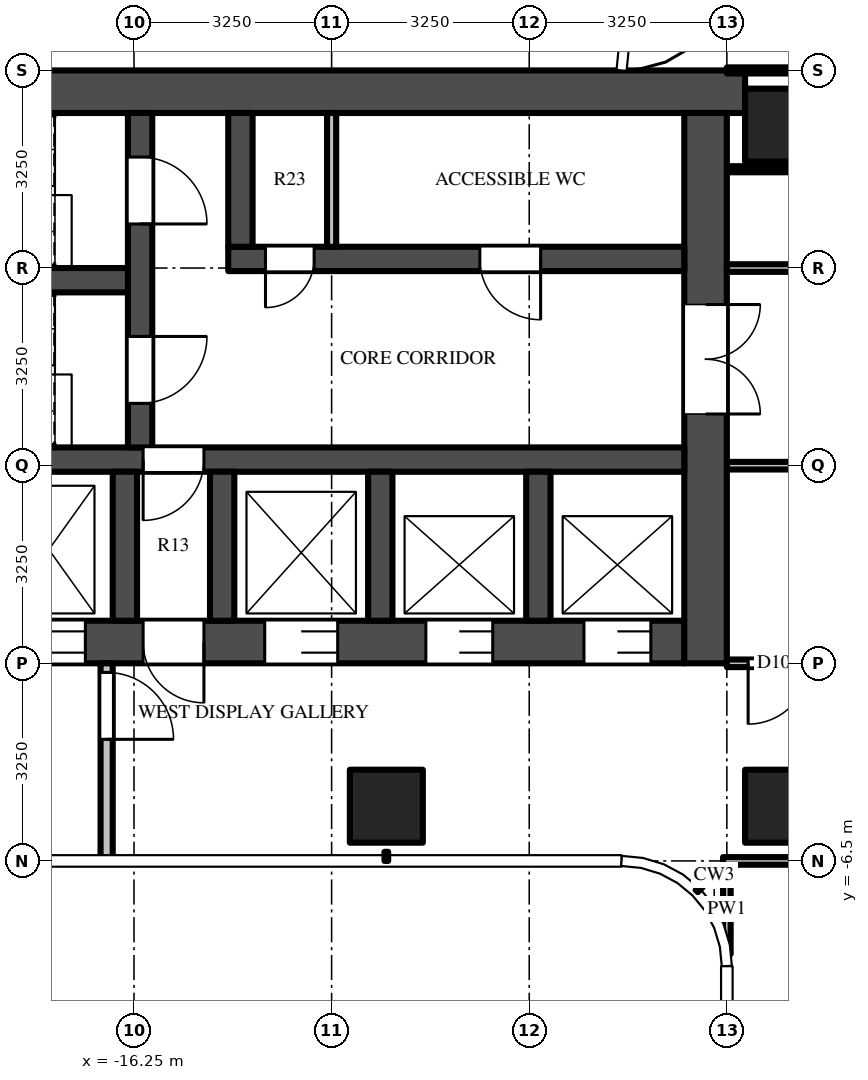
"""IFC4 building model, lengths in metres.
Left out: names, types, materials, properties, quantities, classifications, styles, units other than length and angle.
Written with IfcOpenShell. Run it as: python <this file> out.ifc"""

import sys

from ifc_helpers import new_model, si_unit, direction, frame, frame_2d, origin, origin_2d, place, context, subcontext, project, spatial, rectangle, extrude, source, transform, mapped, element, fill, save


model = new_model("IFC4")
c1 = context("Model", 3, precision=1e-05, world=origin(), true_north=direction((0.0, 1.0)))
c2 = subcontext(c1, "Body", "Model", "MODEL_VIEW")
j1 = project(units=[si_unit("LENGTHUNIT", "METRE"), si_unit("PLANEANGLEUNIT", "RADIAN")], contexts=[c1])
p1 = place(None, origin())
s1 = spatial("IfcSite", under=j1, at=p1, CompositionType="ELEMENT")
p2 = place(p1, origin())
s2 = spatial("IfcBuilding", under=s1, at=p2, CompositionType="ELEMENT")
p3 = place(p2, frame((0.0, 0.0, 162.0)))
s3 = spatial("IfcBuildingStorey", under=s2, at=p3, CompositionType="ELEMENT", Elevation=162.0)
m1 = source(origin(), c2, "Body", "SweptSolid", [
    extrude(rectangle(XDim=1.2, YDim=1.2, at=origin_2d()), origin(), (0.0, 0.0, 1.0), 3.9),
])
for number, where, z_axis, x_axis in (
    (1, (-5.6, 5.6, 0.0), (0.0, 0.0, 1.0), (1.0, 0.0, 0.0)),
    (2, (-5.6, -5.6, 0.0), (0.0, 0.0, 1.0), (1.0, 0.0, 0.0)),
    (3, (-12.1, -5.6, 0.0), (0.0, 0.0, 1.0), (1.0, 0.0, 0.0)),
):
    element("IfcColumn", number, at=place(p3, frame(where, z_axis=z_axis, x_axis=x_axis)), inside=s3, PredefinedType="COLUMN", context=c2, shape_type="MappedRepresentation", body=[
        mapped(m1, transform((0.0, 0.0, 0.0))),
    ])
m2 = source(origin(), c2, "Body", "SweptSolid", [
    extrude(rectangle(XDim=16.55, YDim=0.7, at=frame_2d((8.275, 0.0))), origin(), (0.0, 0.0, 1.0), 3.7),
])
p4 = place(p3, frame((-6.2, 6.15, 0.0), z_axis=(0.0, 0.0, 1.0), x_axis=(-1.0, 0.0, 0.0)))
e4 = element("IfcWall", 4, at=p4, inside=s3, PredefinedType="SHEAR", context=c2, shape_type="MappedRepresentation", body=[
    mapped(m2, transform((0.0, 0.0, 0.0))),
])
m3 = source(origin(), c2, "Body", "SweptSolid", [
    extrude(rectangle(XDim=14.85, YDim=0.7, at=frame_2d((7.425, 0.0))), origin(), (0.0, 0.0, 1.0), 3.7),
])
p5 = place(p3, frame((-7.2, -2.9, 0.0), z_axis=(0.0, 0.0, 1.0), x_axis=(-1.0, 0.0, 0.0)))
e5 = element("IfcWall", 5, at=p5, inside=s3, PredefinedType="SHEAR", context=c2, shape_type="MappedRepresentation", body=[
    mapped(m3, transform((0.0, 0.0, 0.0))),
])
m4 = source(origin(), c2, "Body", "SweptSolid", [
    extrude(rectangle(XDim=1.1, YDim=2.1, at=frame_2d((0.55, 1.05))), frame((0.0, 0.36, 0.0), z_axis=(0.0, -1.0, 0.0), x_axis=(1.0, 0.0, 0.0)), (0.0, 0.0, 1.0), 0.72),
])
p6 = place(p5, frame((0.55, 0.0, 0.0)))
e6 = element("IfcOpeningElement", 6, at=p6, cuts=e5, PredefinedType="OPENING", context=c2, shape_type="MappedRepresentation", body=[
    mapped(m4, transform((0.0, 0.0, 0.0))),
])
p7 = place(p5, frame((3.15, 0.0, 0.0)))
e7 = element("IfcOpeningElement", 7, at=p7, cuts=e5, PredefinedType="OPENING", context=c2, shape_type="MappedRepresentation", body=[
    mapped(m4, transform((0.0, 0.0, 0.0))),
])
m5 = source(origin(), c2, "Body", "SweptSolid", [
    extrude(rectangle(XDim=1.2, YDim=2.1, at=frame_2d((0.6, 1.05))), frame((0.0, 0.36, 0.0), z_axis=(0.0, -1.0, 0.0), x_axis=(1.0, 0.0, 0.0)), (0.0, 0.0, 1.0), 0.72),
])
p8 = place(p5, frame((5.7, 0.0, 0.0)))
e8 = element("IfcOpeningElement", 8, at=p8, cuts=e5, PredefinedType="OPENING", context=c2, shape_type="MappedRepresentation", body=[
    mapped(m5, transform((0.0, 0.0, 0.0))),
])
m6 = source(origin(), c2, "Body", "SweptSolid", [
    extrude(rectangle(XDim=1.3, YDim=2.1, at=frame_2d((0.65, 1.05))), frame((0.0, 0.36, 0.0), z_axis=(0.0, -1.0, 0.0), x_axis=(1.0, 0.0, 0.0)), (0.0, 0.0, 1.0), 0.72),
])
p9 = place(p5, frame((12.2, 0.0, 0.0)))
e9 = element("IfcOpeningElement", 9, at=p9, cuts=e5, PredefinedType="OPENING", context=c2, shape_type="MappedRepresentation", body=[
    mapped(m6, transform((0.0, 0.0, 0.0))),
])
p10 = place(p5, frame((9.85, 0.0, 0.0)))
e10 = element("IfcOpeningElement", 10, at=p10, cuts=e5, PredefinedType="OPENING", context=c2, shape_type="MappedRepresentation", body=[
    mapped(m5, transform((0.0, 0.0, 0.0))),
])
m7 = source(origin(), c2, "Body", "SweptSolid", [
    extrude(rectangle(XDim=1.0, YDim=2.1, at=frame_2d((0.5, 1.05))), frame((0.0, 0.36, 0.0), z_axis=(0.0, -1.0, 0.0), x_axis=(1.0, 0.0, 0.0)), (0.0, 0.0, 1.0), 0.72),
])
p11 = place(p5, frame((7.9, 0.0, 0.0)))
e11 = element("IfcOpeningElement", 11, at=p11, cuts=e5, PredefinedType="OPENING", context=c2, shape_type="MappedRepresentation", body=[
    mapped(m7, transform((0.0, 0.0, 0.0))),
])
m8 = source(origin(), c2, "Body", "SweptSolid", [
    extrude(rectangle(XDim=9.05, YDim=0.7, at=frame_2d((4.525, 0.0))), origin(), (0.0, 0.0, 1.0), 3.7),
])
p12 = place(p3, frame((-6.85, 5.8, 0.0), z_axis=(0.0, 0.0, 1.0), x_axis=(0.0, -1.0, 0.0)))
e12 = element("IfcWall", 12, at=p12, inside=s3, PredefinedType="SHEAR", context=c2, shape_type="MappedRepresentation", body=[
    mapped(m8, transform((0.0, 0.0, 0.0))),
])
m9 = source(origin(), c2, "Body", "SweptSolid", [
    extrude(rectangle(XDim=1.8, YDim=2.1, at=frame_2d((0.9, 1.05))), frame((0.0, 0.36, 0.0), z_axis=(0.0, -1.0, 0.0), x_axis=(1.0, 0.0, 0.0)), (0.0, 0.0, 1.0), 0.72),
])
p13 = place(p12, frame((3.15, 0.0, 0.0)))
e13 = element("IfcOpeningElement", 13, at=p13, cuts=e12, PredefinedType="OPENING", context=c2, shape_type="MappedRepresentation", body=[
    mapped(m9, transform((0.0, 0.0, 0.0))),
])
m10 = source(origin(), c2, "Body", "SweptSolid", [
    extrude(rectangle(XDim=7.5, YDim=0.4, at=frame_2d((3.75, 0.0))), origin(), (0.0, 0.0, 1.0), 3.7),
])
p14 = place(p3, frame((-7.2, 3.4, 0.0), z_axis=(0.0, 0.0, 1.0), x_axis=(-1.0, 0.0, 0.0)))
e14 = element("IfcWall", 14, at=p14, inside=s3, PredefinedType="SHEAR", context=c2, shape_type="MappedRepresentation", body=[
    mapped(m10, transform((0.0, 0.0, 0.0))),
])
m11 = source(origin(), c2, "Body", "SweptSolid", [
    extrude(rectangle(XDim=1.0, YDim=2.1, at=frame_2d((0.5, 1.05))), frame((0.0, 0.21, 0.0), z_axis=(0.0, -1.0, 0.0), x_axis=(1.0, 0.0, 0.0)), (0.0, 0.0, 1.0), 0.42),
])
p15 = place(p14, frame((2.363, 0.0, 0.0)))
e15 = element("IfcOpeningElement", 15, at=p15, cuts=e14, PredefinedType="OPENING", context=c2, shape_type="MappedRepresentation", body=[
    mapped(m11, transform((0.0, 0.0, 0.0))),
])
m12 = source(origin(), c2, "Body", "SweptSolid", [
    extrude(rectangle(XDim=0.8, YDim=2.1, at=frame_2d((0.4, 1.05))), frame((0.0, 0.21, 0.0), z_axis=(0.0, -1.0, 0.0), x_axis=(1.0, 0.0, 0.0)), (0.0, 0.0, 1.0), 0.42),
])
p16 = place(p14, frame((6.087, 0.0, 0.0)))
e16 = element("IfcOpeningElement", 16, at=p16, cuts=e14, PredefinedType="OPENING", context=c2, shape_type="MappedRepresentation", body=[
    mapped(m12, transform((0.0, 0.0, 0.0))),
])
m13 = source(origin(), c2, "Body", "SweptSolid", [
    extrude(rectangle(XDim=14.85, YDim=0.4, at=frame_2d((7.425, 0.0))), origin(), (0.0, 0.0, 1.0), 3.7),
])
p17 = place(p3, frame((-7.2, 0.1, 0.0), z_axis=(0.0, 0.0, 1.0), x_axis=(-1.0, 0.0, 0.0)))
e17 = element("IfcWall", 17, at=p17, inside=s3, PredefinedType="SHEAR", context=c2, shape_type="MappedRepresentation", body=[
    mapped(m13, transform((0.0, 0.0, 0.0))),
])
p18 = place(p17, frame((7.9, 0.0, 0.0)))
e18 = element("IfcOpeningElement", 18, at=p18, cuts=e17, PredefinedType="OPENING", context=c2, shape_type="MappedRepresentation", body=[
    mapped(m11, transform((0.0, 0.0, 0.0))),
])
m14 = source(origin(), c2, "Body", "SweptSolid", [
    extrude(rectangle(XDim=5.5, YDim=0.4, at=frame_2d((2.75, 0.0))), origin(), (0.0, 0.0, 1.0), 3.7),
])
p19 = place(p3, frame((-16.15, 5.8, 0.0), z_axis=(0.0, 0.0, 1.0), x_axis=(0.0, -1.0, 0.0)))
e19 = element("IfcWall", 19, at=p19, inside=s3, PredefinedType="SHEAR", context=c2, shape_type="MappedRepresentation", body=[
    mapped(m14, transform((0.0, 0.0, 0.0))),
])
m15 = source(origin(), c2, "Body", "SweptSolid", [
    extrude(rectangle(XDim=1.1, YDim=2.1, at=frame_2d((0.55, 1.05))), frame((0.0, 0.21, 0.0), z_axis=(0.0, -1.0, 0.0), x_axis=(1.0, 0.0, 0.0)), (0.0, 0.0, 1.0), 0.42),
])
p20 = place(p19, frame((0.725, 0.0, 0.0)))
e20 = element("IfcOpeningElement", 20, at=p20, cuts=e19, PredefinedType="OPENING", context=c2, shape_type="MappedRepresentation", body=[
    mapped(m15, transform((0.0, 0.0, 0.0))),
])
p21 = place(p19, frame((3.675, 0.0, 0.0)))
e21 = element("IfcOpeningElement", 21, at=p21, cuts=e19, PredefinedType="OPENING", context=c2, shape_type="MappedRepresentation", body=[
    mapped(m15, transform((0.0, 0.0, 0.0))),
])
m16 = source(origin(), c2, "Body", "SweptSolid", [
    extrude(rectangle(XDim=5.7, YDim=0.4, at=frame_2d((2.85, 0.0))), origin(), (0.0, 0.0, 1.0), 3.7),
])
p22 = place(p3, frame((-16.35, 3.05, 0.0), z_axis=(0.0, 0.0, 1.0), x_axis=(-1.0, 0.0, 0.0)))
e22 = element("IfcWall", 22, at=p22, inside=s3, PredefinedType="SHEAR", context=c2, shape_type="MappedRepresentation", body=[
    mapped(m16, transform((0.0, 0.0, 0.0))),
])
m17 = source(origin(), c2, "Body", "SweptSolid", [
    extrude(rectangle(XDim=2.2, YDim=0.4, at=frame_2d((1.1, 0.0))), origin(), (0.0, 0.0, 1.0), 3.7),
])
p23 = place(p3, frame((-14.5, 5.8, 0.0), z_axis=(0.0, 0.0, 1.0), x_axis=(0.0, -1.0, 0.0)))
e23 = element("IfcWall", 23, at=p23, inside=s3, PredefinedType="SHEAR", context=c2, shape_type="MappedRepresentation", body=[
    mapped(m17, transform((0.0, 0.0, 0.0))),
])
m18 = source(origin(), c2, "Body", "SweptSolid", [
    extrude(rectangle(XDim=2.45, YDim=0.4, at=frame_2d((1.225, 0.0))), origin(), (0.0, 0.0, 1.0), 3.7),
])
for number, where, z_axis, x_axis in (
    (24, (-9.6, -0.1, 0.0), (0.0, 0.0, 1.0), (0.0, -1.0, 0.0)),
    (25, (-12.2, -0.1, 0.0), (0.0, 0.0, 1.0), (0.0, -1.0, 0.0)),
    (26, (-14.8, -0.1, 0.0), (0.0, 0.0, 1.0), (0.0, -1.0, 0.0)),
    (27, (-16.4, -0.1, 0.0), (0.0, 0.0, 1.0), (0.0, -1.0, 0.0)),
):
    element("IfcWall", number, at=place(p3, frame(where, z_axis=z_axis, x_axis=x_axis)), inside=s3, PredefinedType="SHEAR", context=c2, shape_type="MappedRepresentation", body=[
        mapped(m18, transform((0.0, 0.0, 0.0))),
    ])
m19 = source(origin(), c2, "Body", "SweptSolid", [
    extrude(rectangle(XDim=3.25, YDim=0.2, at=frame_2d((1.625, 0.0))), origin(), (0.0, 0.0, 1.0), 3.7),
])
p24 = place(p3, frame((-16.7, -3.25, 0.0), z_axis=(0.0, 0.0, 1.0), x_axis=(0.0, -1.0, 0.0)))
e28 = element("IfcWall", 28, at=p24, inside=s3, PredefinedType="PARTITIONING", context=c2, shape_type="MappedRepresentation", body=[
    mapped(m19, transform((0.0, 0.0, 0.0))),
])
m20 = source(origin(), c2, "Body", "SweptSolid", [
    extrude(rectangle(XDim=1.1, YDim=2.1, at=frame_2d((0.55, 1.05))), frame((0.0, 0.11, 0.0), z_axis=(0.0, -1.0, 0.0), x_axis=(1.0, 0.0, 0.0)), (0.0, 0.0, 1.0), 0.22),
])
p25 = place(p24, frame((0.15, 0.0, 0.0)))
e29 = element("IfcOpeningElement", 29, at=p25, cuts=e28, PredefinedType="OPENING", context=c2, shape_type="MappedRepresentation", body=[
    mapped(m20, transform((0.0, 0.0, 0.0))),
])
m21 = source(origin(), c2, "Body", "SweptSolid", [
    extrude(rectangle(XDim=2.2, YDim=0.15, at=frame_2d((1.1, 0.0))), origin(), (0.0, 0.0, 1.0), 3.7),
])
p26 = place(p3, frame((-13.0, 5.8, 0.0), z_axis=(0.0, 0.0, 1.0), x_axis=(0.0, -1.0, 0.0)))
e30 = element("IfcWall", 30, at=p26, inside=s3, PredefinedType="PARTITIONING", context=c2, shape_type="MappedRepresentation", body=[
    mapped(m21, transform((0.0, 0.0, 0.0))),
])
m22 = source(origin(), c2, "Body", "SweptSolid", [
    extrude(rectangle(XDim=1.469, YDim=0.125, at=frame_2d((0.734, 0.0))), origin(), (0.0, 0.0, 1.0), 3.7),
])
p27 = place(p3, frame((-6.5, -6.562, 0.0), z_axis=(0.0, 0.0, 1.0), x_axis=(0.0, -1.0, 0.0)))
e31 = element("IfcWall", 31, at=p27, inside=s3, PredefinedType="PARTITIONING", context=c2, shape_type="MappedRepresentation", body=[
    mapped(m22, transform((0.0, 0.0, 0.0))),
])
m23 = source(origin(), c2, "Body", "SweptSolid", [
    extrude(rectangle(XDim=3.725, YDim=0.125, at=frame_2d((1.863, 0.0))), origin(), (0.0, 0.0, 1.0), 2.78),
])
p28 = place(p3, frame((-2.837, -6.5, 0.0), z_axis=(0.0, 0.0, 1.0), x_axis=(-1.0, 0.0, 0.0)))
e32 = element("IfcWall", 32, at=p28, inside=s3, PredefinedType="PARTITIONING", context=c2, shape_type="MappedRepresentation", body=[
    mapped(m23, transform((0.0, 0.0, 0.0))),
])
m24 = source(origin(), c2, "Body", "SweptSolid", [
    extrude(rectangle(XDim=5.363, YDim=0.125, at=frame_2d((2.681, 0.0))), origin(), (0.0, 0.0, 1.0), 2.997),
])
p29 = place(p3, frame((-1.137, -3.25, 0.0), z_axis=(0.0, 0.0, 1.0), x_axis=(-1.0, 0.0, 0.0)))
e33 = element("IfcWall", 33, at=p29, inside=s3, PredefinedType="PARTITIONING", context=c2, shape_type="MappedRepresentation", body=[
    mapped(m24, transform((0.0, 0.0, 0.0))),
])
m25 = source(origin(), c2, "Body", "SweptSolid", [
    extrude(rectangle(XDim=1.0, YDim=2.1, at=frame_2d((0.5, 1.05))), frame((0.0, 0.073, 0.0), z_axis=(0.0, -1.0, 0.0), x_axis=(1.0, 0.0, 0.0)), (0.0, 0.0, 1.0), 0.145),
])
p30 = place(p29, frame((4.012, 0.0, 0.0)))
e34 = element("IfcOpeningElement", 34, at=p30, cuts=e33, PredefinedType="OPENING", context=c2, shape_type="MappedRepresentation", body=[
    mapped(m25, transform((0.0, 0.0, 0.0))),
])
p31 = place(p3, frame((-1.137, 0.0, 0.0), z_axis=(0.0, 0.0, 1.0), x_axis=(-1.0, 0.0, 0.0)))
e35 = element("IfcWall", 35, at=p31, inside=s3, PredefinedType="PARTITIONING", context=c2, shape_type="MappedRepresentation", body=[
    mapped(m24, transform((0.0, 0.0, 0.0))),
])
p32 = place(p3, frame((-6.5, 3.25, 0.0), z_axis=(0.0, 0.0, 1.0), x_axis=(1.0, 0.0, 0.0)))
e36 = element("IfcWall", 36, at=p32, inside=s3, PredefinedType="PARTITIONING", context=c2, shape_type="MappedRepresentation", body=[
    mapped(m24, transform((0.0, 0.0, 0.0))),
])
p33 = place(p32, frame((3.95, 0.0, 0.0)))
e37 = element("IfcOpeningElement", 37, at=p33, cuts=e36, PredefinedType="OPENING", context=c2, shape_type="MappedRepresentation", body=[
    mapped(m25, transform((0.0, 0.0, 0.0))),
])
m26 = source(origin(), c2, "Body", "SweptSolid", [
    extrude(rectangle(XDim=5.238, YDim=0.1, at=frame_2d((2.619, 0.0))), origin(), (0.0, 0.0, 1.0), 2.997),
])
p34 = place(p3, frame((-6.5, 4.875, 0.0), z_axis=(0.0, 0.0, 1.0), x_axis=(1.0, 0.0, 0.0)))
e38 = element("IfcWall", 38, at=p34, inside=s3, PredefinedType="PARTITIONING", context=c2, shape_type="MappedRepresentation", body=[
    mapped(m26, transform((0.0, 0.0, 0.0))),
])
m27 = source(origin(), c2, "Body", "SweptSolid", [
    extrude(rectangle(XDim=5.363, YDim=0.1, at=frame_2d((2.681, 0.0))), origin(), (0.0, 0.0, 1.0), 2.78),
])
p35 = place(p3, frame((-6.5, 6.5, 0.0), z_axis=(0.0, 0.0, 1.0), x_axis=(1.0, 0.0, 0.0)))
e39 = element("IfcWall", 39, at=p35, inside=s3, PredefinedType="PARTITIONING", context=c2, shape_type="MappedRepresentation", body=[
    mapped(m27, transform((0.0, 0.0, 0.0))),
])
m28 = source(origin(), c2, "Body", "SweptSolid", [
    extrude(rectangle(XDim=1.1, YDim=2.1, at=frame_2d((0.55, 1.05))), frame((0.0, -0.275, 0.0), z_axis=(0.0, -1.0, 0.0), x_axis=(1.0, 0.0, 0.0)), (0.0, 0.0, 1.0), 0.05),
])
p36 = place(p6, origin())
e40 = element("IfcDoor", 40, at=p36, inside=s3, OperationType="DOUBLE_DOOR_SLIDING", PredefinedType="DOOR", context=c2, shape_type="MappedRepresentation", body=[
    mapped(m28, transform((0.0, 0.0, 0.0))),
])
fill(e6, e40)
p37 = place(p7, origin())
e41 = element("IfcDoor", 41, at=p37, inside=s3, OperationType="DOUBLE_DOOR_SLIDING", PredefinedType="DOOR", context=c2, shape_type="MappedRepresentation", body=[
    mapped(m28, transform((0.0, 0.0, 0.0))),
])
fill(e7, e41)
m29 = source(origin(), c2, "Body", "SweptSolid", [
    extrude(rectangle(XDim=1.2, YDim=2.1, at=frame_2d((0.6, 1.05))), frame((0.0, -0.275, 0.0), z_axis=(0.0, -1.0, 0.0), x_axis=(1.0, 0.0, 0.0)), (0.0, 0.0, 1.0), 0.05),
])
p38 = place(p8, origin())
e42 = element("IfcDoor", 42, at=p38, inside=s3, OperationType="DOUBLE_DOOR_SLIDING", PredefinedType="DOOR", context=c2, shape_type="MappedRepresentation", body=[
    mapped(m29, transform((0.0, 0.0, 0.0))),
])
fill(e8, e42)
p39 = place(p10, origin())
e43 = element("IfcDoor", 43, at=p39, inside=s3, OperationType="DOUBLE_DOOR_SLIDING", PredefinedType="DOOR", context=c2, shape_type="MappedRepresentation", body=[
    mapped(m29, transform((0.0, 0.0, 0.0))),
])
fill(e10, e43)
m30 = source(origin(), c2, "Body", "SweptSolid", [
    extrude(rectangle(XDim=1.8, YDim=2.1, at=frame_2d((0.9, 1.05))), frame((0.0, -0.275, 0.0), z_axis=(0.0, -1.0, 0.0), x_axis=(1.0, 0.0, 0.0)), (0.0, 0.0, 1.0), 0.05),
])
p40 = place(p13, origin())
e44 = element("IfcDoor", 44, at=p40, inside=s3, OperationType="DOUBLE_DOOR_SINGLE_SWING", PredefinedType="DOOR", context=c2, shape_type="MappedRepresentation", body=[
    mapped(m30, transform((0.0, 0.0, 0.0))),
])
fill(e13, e44)
m31 = source(origin(), c2, "Body", "SweptSolid", [
    extrude(rectangle(XDim=1.1, YDim=2.1, at=frame_2d((0.55, 1.05))), frame((0.0, 0.025, 0.0), z_axis=(0.0, -1.0, 0.0), x_axis=(1.0, 0.0, 0.0)), (0.0, 0.0, 1.0), 0.05),
])
p41 = place(p20, origin())
e45 = element("IfcDoor", 45, at=p41, inside=s3, OperationType="SINGLE_SWING_RIGHT", PredefinedType="DOOR", context=c2, shape_type="MappedRepresentation", body=[
    mapped(m31, transform((0.0, 0.0, 0.0))),
])
fill(e20, e45)
p42 = place(p21, origin())
e46 = element("IfcDoor", 46, at=p42, inside=s3, OperationType="SINGLE_SWING_LEFT", PredefinedType="DOOR", context=c2, shape_type="MappedRepresentation", body=[
    mapped(m31, transform((0.0, 0.0, 0.0))),
])
fill(e21, e46)
m32 = source(origin(), c2, "Body", "SweptSolid", [
    extrude(rectangle(XDim=1.0, YDim=2.1, at=frame_2d((0.5, 1.05))), frame((0.0, 0.025, 0.0), z_axis=(0.0, -1.0, 0.0), x_axis=(1.0, 0.0, 0.0)), (0.0, 0.0, 1.0), 0.05),
])
p43 = place(p18, origin())
e47 = element("IfcDoor", 47, at=p43, inside=s3, OperationType="SINGLE_SWING_RIGHT", PredefinedType="DOOR", context=c2, shape_type="MappedRepresentation", body=[
    mapped(m32, transform((0.0, 0.0, 0.0))),
])
fill(e18, e47)
m33 = source(origin(), c2, "Body", "SweptSolid", [
    extrude(rectangle(XDim=1.0, YDim=2.1, at=frame_2d((0.5, 1.05))), frame((0.0, -0.275, 0.0), z_axis=(0.0, -1.0, 0.0), x_axis=(1.0, 0.0, 0.0)), (0.0, 0.0, 1.0), 0.05),
])
p44 = place(p11, origin())
e48 = element("IfcDoor", 48, at=p44, inside=s3, OperationType="SINGLE_SWING_LEFT", PredefinedType="DOOR", context=c2, shape_type="MappedRepresentation", body=[
    mapped(m33, transform((0.0, 0.0, 0.0))),
])
fill(e11, e48)
p45 = place(p25, origin())
e49 = element("IfcDoor", 49, at=p45, inside=s3, OperationType="SINGLE_SWING_RIGHT", PredefinedType="DOOR", context=c2, shape_type="MappedRepresentation", body=[
    mapped(m31, transform((0.0, 0.0, 0.0))),
])
fill(e29, e49)
p46 = place(p15, origin())
e50 = element("IfcDoor", 50, at=p46, inside=s3, OperationType="SINGLE_SWING_LEFT", PredefinedType="DOOR", context=c2, shape_type="MappedRepresentation", body=[
    mapped(m32, transform((0.0, 0.0, 0.0))),
])
fill(e15, e50)
m34 = source(origin(), c2, "Body", "SweptSolid", [
    extrude(rectangle(XDim=0.8, YDim=2.1, at=frame_2d((0.4, 1.05))), frame((0.0, 0.025, 0.0), z_axis=(0.0, -1.0, 0.0), x_axis=(1.0, 0.0, 0.0)), (0.0, 0.0, 1.0), 0.05),
])
p47 = place(p16, origin())
e51 = element("IfcDoor", 51, at=p47, inside=s3, OperationType="SINGLE_SWING_RIGHT", PredefinedType="DOOR", context=c2, shape_type="MappedRepresentation", body=[
    mapped(m34, transform((0.0, 0.0, 0.0))),
])
fill(e16, e51)
p48 = place(p30, origin())
e52 = element("IfcDoor", 52, at=p48, inside=s3, OperationType="SINGLE_SWING_RIGHT", PredefinedType="DOOR", context=c2, shape_type="MappedRepresentation", body=[
    mapped(m32, transform((0.0, 0.0, 0.0))),
])
fill(e34, e52)
save(model, sys.argv[1])
